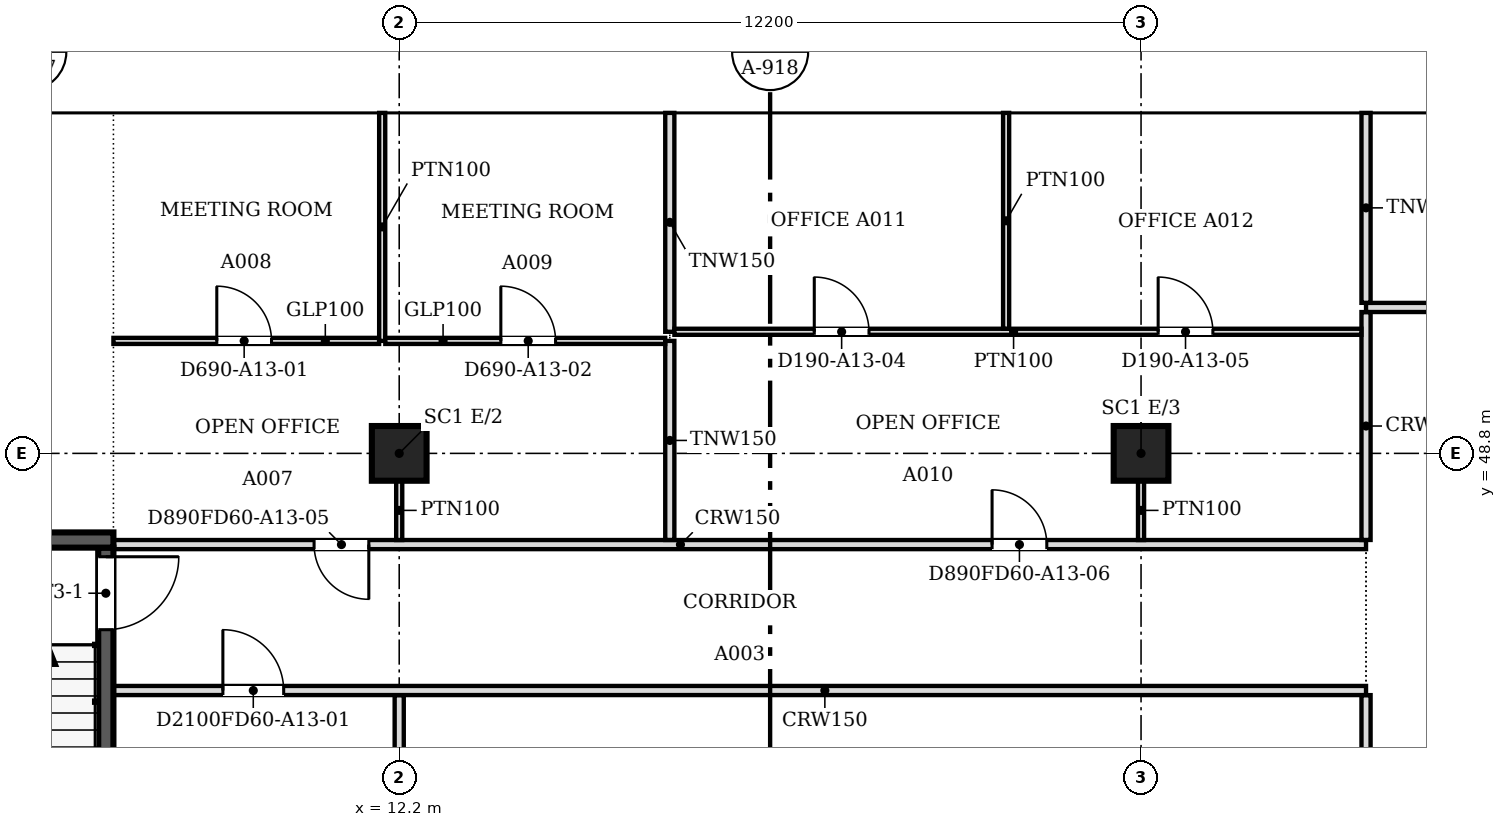
"""IFC4 building model, lengths in metres.
Left out: names, types, materials, properties, quantities, classifications, styles, units other than length and angle.
Written with IfcOpenShell. Run it as: python <this file> out.ifc"""

import sys

from ifc_helpers import new_model, si_unit, direction, frame, frame_2d, origin, origin_2d, place, context, subcontext, project, spatial, polyline, rectangle, outline, extrude, faceted_brep, source, transform, mapped, element, fill, save


model = new_model("IFC4")
c1 = context("Model", 3, precision=1e-05, world=origin(), true_north=direction((0.0, 1.0)))
c2 = subcontext(c1, "Body", "Model", "MODEL_VIEW")
j1 = project(units=[si_unit("LENGTHUNIT", "METRE"), si_unit("PLANEANGLEUNIT", "RADIAN")], contexts=[c1])
p1 = place(None, origin())
s1 = spatial("IfcSite", under=j1, at=p1, CompositionType="ELEMENT")
p2 = place(p1, origin())
s2 = spatial("IfcBuilding", under=s1, at=p2, CompositionType="ELEMENT")
p3 = place(p2, frame((0.0, 0.0, 143.0)))
s3 = spatial("IfcBuildingStorey", under=s2, at=p3, CompositionType="ELEMENT", Elevation=143.0)
for number, where, z_axis, x_axis in (
    (1, (12.2, 48.8, 0.0), (0.0, 0.0, 1.0), (1.0, 0.0, 0.0)),
    (2, (24.4, 48.8, 0.0), (0.0, 0.0, 1.0), (1.0, 0.0, 0.0)),
):
    element("IfcColumn", number, at=place(p3, frame(where, z_axis=z_axis, x_axis=x_axis)), inside=s3, PredefinedType="COLUMN", context=c2, shape_type="SweptSolid", body=[
        extrude(rectangle(XDim=0.9, YDim=0.9, at=origin_2d()), origin(), (0.0, 0.0, 1.0), 3.6),
    ])
m1 = source(origin(), c2, "Body", "SweptSolid", [
    extrude(outline(polyline([(3.05, 0.0), (6.1, 3.8), (3.05, 7.6), (0.0, 3.8), (3.05, 0.0)])), frame((0.0, 0.25, 0.0), z_axis=(0.0, -1.0, 0.0), x_axis=(1.0, 0.0, 0.0)), (0.0, 0.0, 1.0), 0.5),
])
p4 = place(p3, frame((33.55, 54.65, -3.8), z_axis=(0.0, 0.0, 1.0), x_axis=(-1.0, 0.0, 0.0)))
e3 = element("IfcWall", 3, at=p4, inside=s3, PredefinedType="SOLIDWALL", context=c2, shape_type="MappedRepresentation", body=[
    mapped(m1, transform((0.0, 0.0, 0.0), scale=1.0)),
])
m2 = source(origin(), c2, "Body", "SweptSolid", [
    extrude(outline(polyline([(3.05, 0.399), (5.78, 3.8), (3.05, 7.201), (0.321, 3.8), (3.05, 0.399)])), frame((0.0, 0.26, 0.0), z_axis=(0.0, -1.0, 0.0), x_axis=(1.0, 0.0, 0.0)), (0.0, 0.0, 1.0), 0.52),
])
p5 = place(p4, origin())
e4 = element("IfcOpeningElement", 4, at=p5, cuts=e3, PredefinedType="OPENING", context=c2, shape_type="MappedRepresentation", body=[
    mapped(m2, transform((0.0, 0.0, 0.0), scale=1.0)),
])
m3 = source(origin(), c2, "Body", "Brep", [
    faceted_brep([(3.05, -0.25, 0.0), (6.1, -0.25, 3.8), (6.1, -0.25, 3.8), (3.05, -0.25, 7.6), (0.0, -0.25, 3.8), (0.0, 0.25, 3.8), (3.05, 0.25, 7.6), (6.1, 0.25, 3.8), (6.1, 0.25, 3.8), (3.05, 0.25, 0.0)], [[[0, 1, 2, 3, 4]], [[5, 6, 7, 8, 9]], [[9, 8, 1, 0]], [[7, 6, 3, 2]], [[6, 5, 4, 3]], [[5, 9, 0, 4]], [[1, 8, 7, 2]]]),
])
p6 = place(p3, frame((27.45, 54.65, -3.8), z_axis=(0.0, 0.0, 1.0), x_axis=(-1.0, 0.0, 0.0)))
e5 = element("IfcWall", 5, at=p6, inside=s3, PredefinedType="SOLIDWALL", context=c2, shape_type="MappedRepresentation", body=[
    mapped(m3, transform((0.0, 0.0, 0.0), scale=1.0)),
])
p7 = place(p6, origin())
e6 = element("IfcOpeningElement", 6, at=p7, cuts=e5, PredefinedType="OPENING", context=c2, shape_type="MappedRepresentation", body=[
    mapped(m2, transform((0.0, 0.0, 0.0), scale=1.0)),
])
p8 = place(p3, frame((21.35, 54.65, -3.8), z_axis=(0.0, 0.0, 1.0), x_axis=(-1.0, 0.0, 0.0)))
e7 = element("IfcWall", 7, at=p8, inside=s3, PredefinedType="SOLIDWALL", context=c2, shape_type="MappedRepresentation", body=[
    mapped(m1, transform((0.0, 0.0, 0.0), scale=1.0)),
])
p9 = place(p8, origin())
e8 = element("IfcOpeningElement", 8, at=p9, cuts=e7, PredefinedType="OPENING", context=c2, shape_type="MappedRepresentation", body=[
    mapped(m2, transform((0.0, 0.0, 0.0), scale=1.0)),
])
p10 = place(p3, frame((15.25, 54.65, -3.8), z_axis=(0.0, 0.0, 1.0), x_axis=(-1.0, 0.0, 0.0)))
e9 = element("IfcWall", 9, at=p10, inside=s3, PredefinedType="SOLIDWALL", context=c2, shape_type="MappedRepresentation", body=[
    mapped(m1, transform((0.0, 0.0, 0.0), scale=1.0)),
])
p11 = place(p10, origin())
e10 = element("IfcOpeningElement", 10, at=p11, cuts=e9, PredefinedType="OPENING", context=c2, shape_type="MappedRepresentation", body=[
    mapped(m2, transform((0.0, 0.0, 0.0), scale=1.0)),
])
m4 = source(origin(), c2, "Body", "Brep", [
    faceted_brep([(3.003, -0.25, 0.0), (3.05, -0.25, 0.06), (3.05, -0.25, 7.54), (3.003, -0.25, 7.6), (0.0, -0.25, 3.8), (0.0, 0.25, 3.8), (2.957, 0.25, 7.541), (2.957, 0.25, 0.059), (3.003, 0.0, 0.0), (3.003, 0.0, 7.6)], [[[0, 1, 2, 3, 4]], [[5, 6, 7]], [[1, 0, 8]], [[9, 3, 2]], [[6, 5, 4, 3, 9]], [[5, 7, 8, 0, 4]], [[1, 8, 7, 6, 9, 2]]]),
])
p12 = place(p3, frame((9.15, 54.65, -3.8), z_axis=(0.0, 0.0, 1.0), x_axis=(-1.0, 0.0, 0.0)))
e11 = element("IfcWall", 11, at=p12, inside=s3, PredefinedType="SOLIDWALL", context=c2, shape_type="MappedRepresentation", body=[
    mapped(m4, transform((0.0, 0.0, 0.0), scale=1.0)),
])
m5 = source(origin(), c2, "Body", "SweptSolid", [
    extrude(outline(polyline([(2.803, 6.944), (0.319, 3.8), (2.803, 0.656), (2.803, 6.944)])), frame((0.0, 0.26, 0.0), z_axis=(0.0, -1.0, 0.0), x_axis=(1.0, 0.0, 0.0)), (0.0, 0.0, 1.0), 0.52),
])
p13 = place(p12, origin())
e12 = element("IfcOpeningElement", 12, at=p13, cuts=e11, PredefinedType="OPENING", context=c2, shape_type="MappedRepresentation", body=[
    mapped(m5, transform((0.0, 0.0, 0.0), scale=1.0)),
])
p14 = place(p2, frame((0.0, 0.0, 146.8)))
s4 = spatial("IfcBuildingStorey", under=s2, at=p14, CompositionType="ELEMENT", Elevation=146.8)
p15 = place(p14, frame((30.5, 54.65, -3.8), z_axis=(0.0, 0.0, 1.0), x_axis=(-1.0, 0.0, 0.0)))
e13 = element("IfcWall", 13, at=p15, inside=s4, PredefinedType="SOLIDWALL", context=c2, shape_type="MappedRepresentation", body=[
    mapped(m1, transform((0.0, 0.0, 0.0), scale=1.0)),
])
p16 = place(p15, origin())
e14 = element("IfcOpeningElement", 14, at=p16, cuts=e13, PredefinedType="OPENING", context=c2, shape_type="MappedRepresentation", body=[
    mapped(m2, transform((0.0, 0.0, 0.0), scale=1.0)),
])
p17 = place(p14, frame((24.4, 54.65, -3.8), z_axis=(0.0, 0.0, 1.0), x_axis=(-1.0, 0.0, 0.0)))
e15 = element("IfcWall", 15, at=p17, inside=s4, PredefinedType="SOLIDWALL", context=c2, shape_type="MappedRepresentation", body=[
    mapped(m3, transform((0.0, 0.0, 0.0), scale=1.0)),
])
p18 = place(p17, origin())
e16 = element("IfcOpeningElement", 16, at=p18, cuts=e15, PredefinedType="OPENING", context=c2, shape_type="MappedRepresentation", body=[
    mapped(m2, transform((0.0, 0.0, 0.0), scale=1.0)),
])
p19 = place(p14, frame((18.3, 54.65, -3.8), z_axis=(0.0, 0.0, 1.0), x_axis=(-1.0, 0.0, 0.0)))
e17 = element("IfcWall", 17, at=p19, inside=s4, PredefinedType="SOLIDWALL", context=c2, shape_type="MappedRepresentation", body=[
    mapped(m1, transform((0.0, 0.0, 0.0), scale=1.0)),
])
p20 = place(p19, origin())
e18 = element("IfcOpeningElement", 18, at=p20, cuts=e17, PredefinedType="OPENING", context=c2, shape_type="MappedRepresentation", body=[
    mapped(m2, transform((0.0, 0.0, 0.0), scale=1.0)),
])
m6 = source(origin(), c2, "Body", "Brep", [
    faceted_brep([(3.05, -0.25, 0.0), (6.053, -0.25, 3.8), (3.05, -0.25, 7.6), (0.0, -0.25, 3.8), (0.0, 0.25, 3.8), (3.05, 0.25, 7.6), (6.007, 0.25, 3.859), (6.007, 0.25, 3.741), (3.05, 0.25, 0.0), (6.053, 0.0, 3.8)], [[[0, 1, 2, 3]], [[4, 5, 6, 7, 8]], [[8, 7, 9, 1, 0]], [[6, 5, 2, 1, 9]], [[5, 4, 3, 2]], [[4, 8, 0, 3]], [[9, 7, 6]]]),
])
p21 = place(p14, frame((12.2, 54.65, -3.8), z_axis=(0.0, 0.0, 1.0), x_axis=(-1.0, 0.0, 0.0)))
e19 = element("IfcWall", 19, at=p21, inside=s4, PredefinedType="SOLIDWALL", context=c2, shape_type="MappedRepresentation", body=[
    mapped(m6, transform((0.0, 0.0, 0.0), scale=1.0)),
])
m7 = source(origin(), c2, "Body", "SweptSolid", [
    extrude(outline(polyline([(3.049, 0.401), (5.735, 3.8), (3.049, 7.199), (0.321, 3.8), (3.049, 0.401)])), frame((0.0, 0.26, 0.0), z_axis=(0.0, -1.0, 0.0), x_axis=(1.0, 0.0, 0.0)), (0.0, 0.0, 1.0), 0.52),
])
p22 = place(p21, origin())
e20 = element("IfcOpeningElement", 20, at=p22, cuts=e19, PredefinedType="OPENING", context=c2, shape_type="MappedRepresentation", body=[
    mapped(m7, transform((0.0, 0.0, 0.0), scale=1.0)),
])
p23 = place(p3, frame((3.6, 47.375, 0.0), z_axis=(0.0, 0.0, 1.0), x_axis=(1.0, 0.0, 0.0)))
e21 = element("IfcWall", 21, at=p23, inside=s3, PredefinedType="SOLIDWALL", context=c2, shape_type="SweptSolid", body=[
    extrude(rectangle(XDim=3.9, YDim=0.25, at=frame_2d((1.95, 0.0))), origin(), (0.0, 0.0, 1.0), 3.8),
])
p24 = place(p3, frame((7.375, 47.25, 0.0), z_axis=(0.0, 0.0, 1.0), x_axis=(0.0, -1.0, 0.0)))
e22 = element("IfcWall", 22, at=p24, inside=s3, PredefinedType="SOLIDWALL", context=c2, shape_type="SweptSolid", body=[
    extrude(rectangle(XDim=8.0, YDim=0.25, at=frame_2d((4.0, 0.0))), origin(), (0.0, 0.0, 1.0), 3.8),
])
m8 = source(origin(), c2, "Body", "SweptSolid", [
    extrude(rectangle(XDim=1.2, YDim=2.1, at=frame_2d((0.6, 1.05))), frame((0.0, 0.135, 0.0), z_axis=(0.0, -1.0, 0.0), x_axis=(1.0, 0.0, 0.0)), (0.0, 0.0, 1.0), 0.27),
])
p25 = place(p24, frame((0.15, 0.0, 0.0)))
e23 = element("IfcOpeningElement", 23, at=p25, cuts=e22, PredefinedType="OPENING", context=c2, shape_type="MappedRepresentation", body=[
    mapped(m8, transform((0.0, 0.0, 0.0), scale=1.0)),
])
p26 = place(p3, frame((28.1, 18.8, 0.0), z_axis=(0.0, 0.0, 1.0), x_axis=(0.0, 1.0, 0.0)))
e24 = element("IfcWall", 24, at=p26, inside=s3, PredefinedType="PARTITIONING", context=c2, shape_type="SweptSolid", body=[
    extrude(rectangle(XDim=26.024, YDim=0.15, at=frame_2d((13.012, 0.0))), origin(), (0.0, 0.0, 1.0), 3.067),
])
m9 = source(origin(), c2, "Body", "SweptSolid", [
    extrude(rectangle(XDim=0.9, YDim=2.1, at=frame_2d((0.45, 1.05))), frame((0.0, 0.085, 0.0), z_axis=(0.0, -1.0, 0.0), x_axis=(1.0, 0.0, 0.0)), (0.0, 0.0, 1.0), 0.17),
])
p27 = place(p26, frame((1.1, 0.0, 0.0)))
e25 = element("IfcOpeningElement", 25, at=p27, cuts=e24, PredefinedType="OPENING", context=c2, shape_type="MappedRepresentation", body=[
    mapped(m9, transform((0.0, 0.0, 0.0), scale=1.0)),
])
m10 = source(origin(), c2, "Body", "SweptSolid", [
    extrude(rectangle(XDim=1.0, YDim=2.1, at=frame_2d((0.5, 1.05))), frame((0.0, 0.085, 0.0), z_axis=(0.0, -1.0, 0.0), x_axis=(1.0, 0.0, 0.0)), (0.0, 0.0, 1.0), 0.17),
])
p28 = place(p26, frame((14.201, 0.0, 0.0)))
e26 = element("IfcOpeningElement", 26, at=p28, cuts=e24, PredefinedType="OPENING", context=c2, shape_type="MappedRepresentation", body=[
    mapped(m10, transform((0.0, 0.0, 0.0), scale=1.0)),
])
p29 = place(p26, frame((8.2, 0.0, 0.0)))
e27 = element("IfcOpeningElement", 27, at=p29, cuts=e24, PredefinedType="OPENING", context=c2, shape_type="MappedRepresentation", body=[
    mapped(m9, transform((0.0, 0.0, 0.0), scale=1.0)),
])
p30 = place(p26, frame((21.4, 0.0, 0.0)))
e28 = element("IfcOpeningElement", 28, at=p30, cuts=e24, PredefinedType="OPENING", context=c2, shape_type="MappedRepresentation", body=[
    mapped(m10, transform((0.0, 0.0, 0.0), scale=1.0)),
])
p31 = place(p3, frame((12.2, 40.801, 0.0), z_axis=(0.0, 0.0, 1.0), x_axis=(0.0, 1.0, 0.0)))
e29 = element("IfcWall", 29, at=p31, inside=s3, PredefinedType="PARTITIONING", context=c2, shape_type="SweptSolid", body=[
    extrude(rectangle(XDim=4.023, YDim=0.15, at=frame_2d((2.011, 0.0))), origin(), (0.0, 0.0, 1.0), 3.067),
])
p32 = place(p3, frame((28.1, 44.9, 0.0), z_axis=(0.0, 0.0, 1.0), x_axis=(-1.0, 0.0, 0.0)))
e30 = element("IfcWall", 30, at=p32, inside=s3, PredefinedType="PARTITIONING", context=c2, shape_type="SweptSolid", body=[
    extrude(rectangle(XDim=20.6, YDim=0.15, at=frame_2d((10.3, 0.0))), origin(), (0.0, 0.0, 1.0), 3.067),
])
p33 = place(p32, frame((17.8, 0.0, 0.0)))
e31 = element("IfcOpeningElement", 31, at=p33, cuts=e30, PredefinedType="OPENING", context=c2, shape_type="MappedRepresentation", body=[
    mapped(m10, transform((0.0, 0.0, 0.0), scale=1.0)),
])
p34 = place(p3, frame((7.5, 47.3, 0.0), z_axis=(0.0, 0.0, 1.0), x_axis=(1.0, 0.0, 0.0)))
e32 = element("IfcWall", 32, at=p34, inside=s3, PredefinedType="PARTITIONING", context=c2, shape_type="SweptSolid", body=[
    extrude(rectangle(XDim=20.6, YDim=0.15, at=frame_2d((10.3, 0.0))), origin(), (0.0, 0.0, 1.0), 3.067),
])
p35 = place(p34, frame((3.3, 0.0, 0.0)))
e33 = element("IfcOpeningElement", 33, at=p35, cuts=e32, PredefinedType="OPENING", context=c2, shape_type="MappedRepresentation", body=[
    mapped(m9, transform((0.0, 0.0, 0.0), scale=1.0)),
])
p36 = place(p34, frame((14.45, 0.0, 0.0)))
e34 = element("IfcOpeningElement", 34, at=p36, cuts=e32, PredefinedType="OPENING", context=c2, shape_type="MappedRepresentation", body=[
    mapped(m9, transform((0.0, 0.0, 0.0), scale=1.0)),
])
p37 = place(p3, frame((16.65, 47.376, 0.0), z_axis=(0.0, 0.0, 1.0), x_axis=(0.0, 1.0, 0.0)))
e35 = element("IfcWall", 35, at=p37, inside=s3, PredefinedType="PARTITIONING", context=c2, shape_type="SweptSolid", body=[
    extrude(rectangle(XDim=3.274, YDim=0.15, at=frame_2d((1.637, 0.0))), origin(), (0.0, 0.0, 1.0), 3.067),
])
p38 = place(p3, frame((28.1, 47.376, 0.0), z_axis=(0.0, 0.0, 1.0), x_axis=(0.0, 1.0, 0.0)))
e36 = element("IfcWall", 36, at=p38, inside=s3, PredefinedType="PARTITIONING", context=c2, shape_type="SweptSolid", body=[
    extrude(rectangle(XDim=3.748, YDim=0.15, at=frame_2d((1.874, 0.0))), origin(), (0.0, 0.0, 1.0), 3.067),
])
for number, where, z_axis, x_axis in (
    (37, (12.2, 48.35, 0.0), (0.0, 0.0, 1.0), (0.0, -1.0, 0.0)),
    (38, (24.4, 48.35, 0.0), (0.0, 0.0, 1.0), (0.0, -1.0, 0.0)),
):
    element("IfcWall", number, at=place(p3, frame(where, z_axis=z_axis, x_axis=x_axis)), inside=s3, PredefinedType="PARTITIONING", context=c2, shape_type="SweptSolid", body=[
        extrude(rectangle(XDim=0.975, YDim=0.1, at=frame_2d((0.488, 0.0))), origin(), (0.0, 0.0, 1.0), 3.067),
    ])
p39 = place(p3, frame((7.5, 50.65, 0.0), z_axis=(0.0, 0.0, 1.0), x_axis=(1.0, 0.0, 0.0)))
e39 = element("IfcWall", 39, at=p39, inside=s3, PredefinedType="PARTITIONING", context=c2, shape_type="SweptSolid", body=[
    extrude(rectangle(XDim=4.369, YDim=0.1, at=frame_2d((2.185, 0.0))), origin(), (0.0, 0.0, 1.0), 3.067),
])
m11 = source(origin(), c2, "Body", "SweptSolid", [
    extrude(rectangle(XDim=0.9, YDim=2.1, at=frame_2d((0.45, 1.05))), frame((0.0, 0.06, 0.0), z_axis=(0.0, -1.0, 0.0), x_axis=(1.0, 0.0, 0.0)), (0.0, 0.0, 1.0), 0.12),
])
p40 = place(p39, frame((1.7, 0.0, 0.0)))
e40 = element("IfcOpeningElement", 40, at=p40, cuts=e39, PredefinedType="OPENING", context=c2, shape_type="MappedRepresentation", body=[
    mapped(m11, transform((0.0, 0.0, 0.0), scale=1.0)),
])
p41 = place(p3, frame((11.92, 50.65, 0.0), z_axis=(0.0, 0.0, 1.0), x_axis=(0.0, 1.0, 0.0)))
e41 = element("IfcWall", 41, at=p41, inside=s3, PredefinedType="PARTITIONING", context=c2, shape_type="SweptSolid", body=[
    extrude(rectangle(XDim=3.75, YDim=0.1, at=frame_2d((1.875, 0.0))), origin(), (0.0, 0.0, 1.0), 3.067),
])
p42 = place(p3, frame((11.971, 50.65, 0.0), z_axis=(0.0, 0.0, 1.0), x_axis=(1.0, 0.0, 0.0)))
e42 = element("IfcWall", 42, at=p42, inside=s3, PredefinedType="PARTITIONING", context=c2, shape_type="SweptSolid", body=[
    extrude(rectangle(XDim=4.603, YDim=0.1, at=frame_2d((2.301, 0.0))), origin(), (0.0, 0.0, 1.0), 3.067),
])
p43 = place(p42, frame((1.9, 0.0, 0.0)))
e43 = element("IfcOpeningElement", 43, at=p43, cuts=e42, PredefinedType="OPENING", context=c2, shape_type="MappedRepresentation", body=[
    mapped(m11, transform((0.0, 0.0, 0.0), scale=1.0)),
])
p44 = place(p3, frame((16.65, 50.8, 0.0), z_axis=(0.0, 0.0, 1.0), x_axis=(0.0, 1.0, 0.0)))
e44 = element("IfcWall", 44, at=p44, inside=s3, PredefinedType="PARTITIONING", context=c2, shape_type="SweptSolid", body=[
    extrude(rectangle(XDim=3.6, YDim=0.15, at=frame_2d((1.8, 0.0))), origin(), (0.0, 0.0, 1.0), 3.067),
])
p45 = place(p3, frame((16.726, 50.8, 0.0), z_axis=(0.0, 0.0, 1.0), x_axis=(1.0, 0.0, 0.0)))
e45 = element("IfcWall", 45, at=p45, inside=s3, PredefinedType="PARTITIONING", context=c2, shape_type="SweptSolid", body=[
    extrude(rectangle(XDim=11.298, YDim=0.1, at=frame_2d((5.649, 0.0))), origin(), (0.0, 0.0, 1.0), 3.067),
])
p46 = place(p45, frame((2.3, 0.0, 0.0)))
e46 = element("IfcOpeningElement", 46, at=p46, cuts=e45, PredefinedType="OPENING", context=c2, shape_type="MappedRepresentation", body=[
    mapped(m11, transform((0.0, 0.0, 0.0), scale=1.0)),
])
p47 = place(p45, frame((7.955, 0.0, 0.0)))
e47 = element("IfcOpeningElement", 47, at=p47, cuts=e45, PredefinedType="OPENING", context=c2, shape_type="MappedRepresentation", body=[
    mapped(m11, transform((0.0, 0.0, 0.0), scale=1.0)),
])
p48 = place(p3, frame((22.181, 50.851, 0.0), z_axis=(0.0, 0.0, 1.0), x_axis=(0.0, 1.0, 0.0)))
e48 = element("IfcWall", 48, at=p48, inside=s3, PredefinedType="PARTITIONING", context=c2, shape_type="SweptSolid", body=[
    extrude(rectangle(XDim=3.549, YDim=0.1, at=frame_2d((1.774, 0.0))), origin(), (0.0, 0.0, 1.0), 3.067),
])
p49 = place(p3, frame((28.1, 51.2, 0.0), z_axis=(0.0, 0.0, 1.0), x_axis=(1.0, 0.0, 0.0)))
e49 = element("IfcWall", 49, at=p49, inside=s3, PredefinedType="PARTITIONING", context=c2, shape_type="SweptSolid", body=[
    extrude(rectangle(XDim=31.438, YDim=0.15, at=frame_2d((15.719, 0.0))), origin(), (0.0, 0.0, 1.0), 3.067),
])
p50 = place(p49, frame((7.0, 0.0, 0.0)))
e50 = element("IfcOpeningElement", 50, at=p50, cuts=e49, PredefinedType="OPENING", context=c2, shape_type="MappedRepresentation", body=[
    mapped(m9, transform((0.0, 0.0, 0.0), scale=1.0)),
])
p51 = place(p49, frame((22.8, 0.0, 0.0)))
e51 = element("IfcOpeningElement", 51, at=p51, cuts=e49, PredefinedType="OPENING", context=c2, shape_type="MappedRepresentation", body=[
    mapped(m9, transform((0.0, 0.0, 0.0), scale=1.0)),
])
p52 = place(p3, frame((28.1, 51.276, 0.0), z_axis=(0.0, 0.0, 1.0), x_axis=(0.0, 1.0, 0.0)))
e52 = element("IfcWall", 52, at=p52, inside=s3, PredefinedType="PARTITIONING", context=c2, shape_type="SweptSolid", body=[
    extrude(rectangle(XDim=3.124, YDim=0.15, at=frame_2d((1.562, 0.0))), origin(), (0.0, 0.0, 1.0), 3.067),
])
m12 = source(origin(), c2, "Body", "SweptSolid", [
    extrude(rectangle(XDim=1.2, YDim=2.1, at=frame_2d((0.6, 1.05))), frame((0.0, 0.025, 0.0), z_axis=(0.0, -1.0, 0.0), x_axis=(1.0, 0.0, 0.0)), (0.0, 0.0, 1.0), 0.05),
])
p53 = place(p25, origin())
e53 = element("IfcDoor", 53, at=p53, inside=s3, OperationType="SINGLE_SWING_LEFT", PredefinedType="DOOR", context=c2, shape_type="MappedRepresentation", body=[
    mapped(m12, transform((0.0, 0.0, 0.0), scale=1.0)),
])
fill(e23, e53)
m13 = source(origin(), c2, "Body", "SweptSolid", [
    extrude(rectangle(XDim=0.9, YDim=2.1, at=frame_2d((0.45, 1.05))), frame((0.0, 0.025, 0.0), z_axis=(0.0, -1.0, 0.0), x_axis=(1.0, 0.0, 0.0)), (0.0, 0.0, 1.0), 0.05),
])
p54 = place(p40, origin())
e54 = element("IfcDoor", 54, at=p54, inside=s3, OperationType="SINGLE_SWING_LEFT", PredefinedType="DOOR", context=c2, shape_type="MappedRepresentation", body=[
    mapped(m13, transform((0.0, 0.0, 0.0), scale=1.0)),
])
fill(e40, e54)
p55 = place(p43, origin())
e55 = element("IfcDoor", 55, at=p55, inside=s3, OperationType="SINGLE_SWING_LEFT", PredefinedType="DOOR", context=c2, shape_type="MappedRepresentation", body=[
    mapped(m13, transform((0.0, 0.0, 0.0), scale=1.0)),
])
fill(e43, e55)
m14 = source(origin(), c2, "Body", "SweptSolid", [
    extrude(rectangle(XDim=1.0, YDim=2.1, at=frame_2d((0.5, 1.05))), frame((0.0, 0.025, 0.0), z_axis=(0.0, -1.0, 0.0), x_axis=(1.0, 0.0, 0.0)), (0.0, 0.0, 1.0), 0.05),
])
p56 = place(p33, origin())
e56 = element("IfcDoor", 56, at=p56, inside=s3, OperationType="SINGLE_SWING_RIGHT", PredefinedType="DOOR", context=c2, shape_type="MappedRepresentation", body=[
    mapped(m14, transform((0.0, 0.0, 0.0), scale=1.0)),
])
fill(e31, e56)
p57 = place(p46, origin())
e57 = element("IfcDoor", 57, at=p57, inside=s3, OperationType="SINGLE_SWING_LEFT", PredefinedType="DOOR", context=c2, shape_type="MappedRepresentation", body=[
    mapped(m13, transform((0.0, 0.0, 0.0), scale=1.0)),
])
fill(e46, e57)
p58 = place(p47, origin())
e58 = element("IfcDoor", 58, at=p58, inside=s3, OperationType="SINGLE_SWING_LEFT", PredefinedType="DOOR", context=c2, shape_type="MappedRepresentation", body=[
    mapped(m13, transform((0.0, 0.0, 0.0), scale=1.0)),
])
fill(e47, e58)
p59 = place(p35, origin())
e59 = element("IfcDoor", 59, at=p59, inside=s3, OperationType="SINGLE_SWING_RIGHT", PredefinedType="DOOR", context=c2, shape_type="MappedRepresentation", body=[
    mapped(m13, transform((0.0, 0.0, 0.0), scale=1.0)),
])
fill(e33, e59)
p60 = place(p36, origin())
e60 = element("IfcDoor", 60, at=p60, inside=s3, OperationType="SINGLE_SWING_LEFT", PredefinedType="DOOR", context=c2, shape_type="MappedRepresentation", body=[
    mapped(m13, transform((0.0, 0.0, 0.0), scale=1.0)),
])
fill(e34, e60)
save(model, sys.argv[1])
